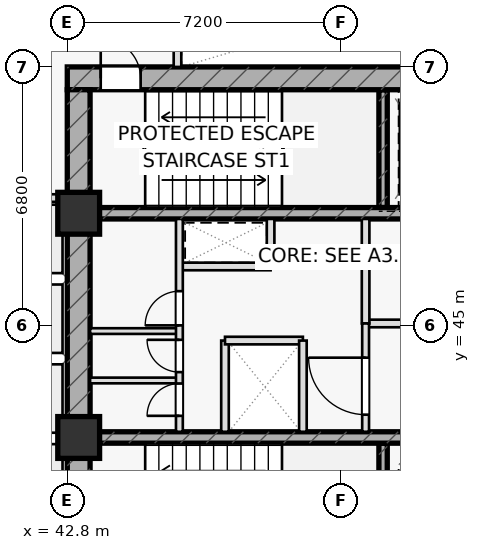
"""IFC4 building model, lengths in metres.
Left out: names, types, materials, properties, quantities, classifications, styles, units other than length and angle.
Written with IfcOpenShell. Run it as: python <this file> out.ifc"""

import sys

from ifc_helpers import new_model, si_unit, direction, frame, frame_2d, origin, origin_2d, place, context, subcontext, project, spatial, rectangle, extrude, element, fill, save


model = new_model("IFC4")
c1 = context("Model", 3, precision=1e-05, world=origin(), true_north=direction((0.0, 1.0)))
c2 = subcontext(c1, "Body", "Model", "MODEL_VIEW")
j1 = project(units=[si_unit("LENGTHUNIT", "METRE"), si_unit("PLANEANGLEUNIT", "RADIAN")], contexts=[c1])
p1 = place(None, origin())
s1 = spatial("IfcSite", under=j1, at=p1, CompositionType="ELEMENT")
p2 = place(p1, origin())
s2 = spatial("IfcBuilding", under=s1, at=p2, CompositionType="ELEMENT")
p3 = place(p2, frame((0.0, 0.0, 43.2)))
s3 = spatial("IfcBuildingStorey", under=s2, at=p3, CompositionType="ELEMENT", Elevation=43.2)
for number, where, z_axis, x_axis in (
    (1, (51.11, 48.1, 0.0), (0.0, 0.0, 1.0), (0.0, 1.0, 0.0)),
    (2, (51.11, 38.8, 0.0), (0.0, 0.0, 1.0), (0.0, 1.0, 0.0)),
):
    element("IfcWall", number, at=place(p3, frame(where, z_axis=z_axis, x_axis=x_axis)), inside=s3, PredefinedType="SHEAR", context=c2, shape_type="SweptSolid", body=[
        extrude(rectangle(XDim=3.1, YDim=0.22, at=frame_2d((1.55, 0.0))), origin(), (0.0, 0.0, 1.0), 3.6),
    ])
p4 = place(p3, frame((42.8, 51.5, 0.0), z_axis=(0.0, 0.0, 1.0), x_axis=(1.0, 0.0, 0.0)))
e3 = element("IfcWall", 3, at=p4, inside=s3, PredefinedType="SHEAR", context=c2, shape_type="SweptSolid", body=[
    extrude(rectangle(XDim=14.4, YDim=0.6, at=frame_2d((7.2, 0.0))), origin(), (0.0, 0.0, 1.0), 3.6),
])
p5 = place(p4, frame((0.88, 0.0, 0.0)))
e4 = element("IfcOpeningElement", 4, at=p5, cuts=e3, PredefinedType="OPENING", context=c2, shape_type="SweptSolid", body=[
    extrude(rectangle(XDim=1.05, YDim=2.2, at=frame_2d((0.525, 1.1))), frame((0.0, 0.31, 0.0), z_axis=(0.0, -1.0, 0.0), x_axis=(1.0, 0.0, 0.0)), (0.0, 0.0, 1.0), 0.62),
])
p6 = place(p3, frame((43.1, 38.8, 0.0), z_axis=(0.0, 0.0, 1.0), x_axis=(0.0, 1.0, 0.0)))
e5 = element("IfcWall", 5, at=p6, inside=s3, PredefinedType="SHEAR", context=c2, shape_type="SweptSolid", body=[
    extrude(rectangle(XDim=12.4, YDim=0.6, at=frame_2d((6.2, 0.0))), origin(), (0.0, 0.0, 1.0), 3.6),
])
p7 = place(p3, frame((43.4, 47.95, 0.0), z_axis=(0.0, 0.0, 1.0), x_axis=(1.0, 0.0, 0.0)))
e6 = element("IfcWall", 6, at=p7, inside=s3, PredefinedType="SHEAR", context=c2, shape_type="SweptSolid", body=[
    extrude(rectangle(XDim=13.2, YDim=0.3, at=frame_2d((6.6, 0.0))), origin(), (0.0, 0.0, 1.0), 3.6),
])
p8 = place(p7, frame((8.345, 0.0, 0.0)))
e7 = element("IfcOpeningElement", 7, at=p8, cuts=e6, PredefinedType="OPENING", context=c2, shape_type="SweptSolid", body=[
    extrude(rectangle(XDim=1.15, YDim=2.2, at=frame_2d((0.575, 1.1))), frame((0.0, 0.16, 0.0), z_axis=(0.0, -1.0, 0.0), x_axis=(1.0, 0.0, 0.0)), (0.0, 0.0, 1.0), 0.32),
])
p9 = place(p7, frame((10.065, 0.0, 0.0)))
e8 = element("IfcOpeningElement", 8, at=p9, cuts=e6, PredefinedType="OPENING", context=c2, shape_type="SweptSolid", body=[
    extrude(rectangle(XDim=1.15, YDim=2.2, at=frame_2d((0.575, 1.1))), frame((0.0, 0.16, 0.0), z_axis=(0.0, -1.0, 0.0), x_axis=(1.0, 0.0, 0.0)), (0.0, 0.0, 1.0), 0.32),
])
p10 = place(p7, frame((11.645, 0.0, 0.0)))
e9 = element("IfcOpeningElement", 9, at=p10, cuts=e6, PredefinedType="OPENING", context=c2, shape_type="SweptSolid", body=[
    extrude(rectangle(XDim=1.15, YDim=2.2, at=frame_2d((0.575, 1.1))), frame((0.0, 0.16, 0.0), z_axis=(0.0, -1.0, 0.0), x_axis=(1.0, 0.0, 0.0)), (0.0, 0.0, 1.0), 0.32),
])
p11 = place(p3, frame((43.4, 42.05, 0.0), z_axis=(0.0, 0.0, 1.0), x_axis=(1.0, 0.0, 0.0)))
e10 = element("IfcWall", 10, at=p11, inside=s3, PredefinedType="SHEAR", context=c2, shape_type="SweptSolid", body=[
    extrude(rectangle(XDim=13.2, YDim=0.3, at=frame_2d((6.6, 0.0))), origin(), (0.0, 0.0, 1.0), 3.6),
])
for number, where, z_axis, x_axis in (
    (11, (43.1, 47.95, 0.0), (0.0, 0.0, 1.0), (1.0, 0.0, 0.0)),
    (12, (43.1, 42.05, 0.0), (0.0, 0.0, 1.0), (1.0, 0.0, 0.0)),
):
    element("IfcColumn", number, at=place(p3, frame(where, z_axis=z_axis, x_axis=x_axis)), inside=s3, PredefinedType="COLUMN", context=c2, shape_type="SweptSolid", body=[
        extrude(rectangle(XDim=1.1, YDim=1.1, at=origin_2d()), origin(), (0.0, 0.0, 1.0), 3.6),
    ])
for number, where, z_axis, x_axis in (
    (13, (40.3, 48.35, 0.0), (0.0, 0.0, 1.0), (1.0, 0.0, 0.0)),
    (14, (45.7, 51.8, 0.0), (0.0, 0.0, 1.0), (0.0, 1.0, 0.0)),
):
    element("IfcWall", number, at=place(p3, frame(where, z_axis=z_axis, x_axis=x_axis)), inside=s3, PredefinedType="PARTITIONING", context=c2, shape_type="SweptSolid", body=[
        extrude(rectangle(XDim=2.5, YDim=0.2, at=frame_2d((1.25, 0.0))), origin(), (0.0, 0.0, 1.0), 3.6),
    ])
p12 = place(p3, frame((45.75, 46.55, 0.0), z_axis=(0.0, 0.0, 1.0), x_axis=(1.0, 0.0, 0.0)))
e15 = element("IfcWall", 15, at=p12, inside=s3, PredefinedType="PARTITIONING", context=c2, shape_type="SweptSolid", body=[
    extrude(rectangle(XDim=2.4, YDim=0.2, at=frame_2d((1.2, 0.0))), origin(), (0.0, 0.0, 1.0), 3.6),
])
p13 = place(p3, frame((48.15, 46.55, 0.0), z_axis=(0.0, 0.0, 1.0), x_axis=(0.0, 1.0, 0.0)))
e16 = element("IfcWall", 16, at=p13, inside=s3, PredefinedType="PARTITIONING", context=c2, shape_type="SweptSolid", body=[
    extrude(rectangle(XDim=1.25, YDim=0.2, at=frame_2d((0.625, 0.0))), origin(), (0.0, 0.0, 1.0), 3.6),
])
p14 = place(p3, frame((46.95, 42.2, 0.0), z_axis=(0.0, 0.0, 1.0), x_axis=(0.0, 1.0, 0.0)))
e17 = element("IfcWall", 17, at=p14, inside=s3, PredefinedType="PARTITIONING", context=c2, shape_type="SweptSolid", body=[
    extrude(rectangle(XDim=2.4, YDim=0.2, at=frame_2d((1.2, 0.0))), origin(), (0.0, 0.0, 1.0), 3.6),
])
p15 = place(p3, frame((46.95, 44.6, 0.0), z_axis=(0.0, 0.0, 1.0), x_axis=(1.0, 0.0, 0.0)))
e18 = element("IfcWall", 18, at=p15, inside=s3, PredefinedType="PARTITIONING", context=c2, shape_type="SweptSolid", body=[
    extrude(rectangle(XDim=2.05, YDim=0.2, at=frame_2d((1.025, 0.0))), origin(), (0.0, 0.0, 1.0), 3.6),
])
p16 = place(p3, frame((50.65, 45.05, 0.0), z_axis=(0.0, 0.0, 1.0), x_axis=(1.0, 0.0, 0.0)))
e19 = element("IfcWall", 19, at=p16, inside=s3, PredefinedType="PARTITIONING", context=c2, shape_type="SweptSolid", body=[
    extrude(rectangle(XDim=5.95, YDim=0.2, at=frame_2d((2.975, 0.0))), origin(), (0.0, 0.0, 1.0), 3.6),
])
p17 = place(p16, frame((1.35, 0.0, 0.0)))
e20 = element("IfcOpeningElement", 20, at=p17, cuts=e19, PredefinedType="OPENING", context=c2, shape_type="SweptSolid", body=[
    extrude(rectangle(XDim=1.5, YDim=2.2, at=frame_2d((0.75, 1.1))), frame((0.0, 0.11, 0.0), z_axis=(0.0, -1.0, 0.0), x_axis=(1.0, 0.0, 0.0)), (0.0, 0.0, 1.0), 0.22),
])
p18 = place(p3, frame((50.65, 45.05, 0.0), z_axis=(0.0, 0.0, 1.0), x_axis=(0.0, 1.0, 0.0)))
e21 = element("IfcWall", 21, at=p18, inside=s3, PredefinedType="PARTITIONING", context=c2, shape_type="SweptSolid", body=[
    extrude(rectangle(XDim=2.75, YDim=0.2, at=frame_2d((1.375, 0.0))), origin(), (0.0, 0.0, 1.0), 3.6),
])
p19 = place(p3, frame((50.65, 42.2, 0.0), z_axis=(0.0, 0.0, 1.0), x_axis=(0.0, 1.0, 0.0)))
e22 = element("IfcWall", 22, at=p19, inside=s3, PredefinedType="PARTITIONING", context=c2, shape_type="SweptSolid", body=[
    extrude(rectangle(XDim=2.85, YDim=0.18, at=frame_2d((1.425, 0.0))), origin(), (0.0, 0.0, 1.0), 3.6),
])
p20 = place(p19, frame((0.45, 0.0, 0.0)))
e23 = element("IfcOpeningElement", 23, at=p20, cuts=e22, PredefinedType="OPENING", context=c2, shape_type="SweptSolid", body=[
    extrude(rectangle(XDim=1.5, YDim=2.2, at=frame_2d((0.75, 1.1))), frame((0.0, 0.1, 0.0), z_axis=(0.0, -1.0, 0.0), x_axis=(1.0, 0.0, 0.0)), (0.0, 0.0, 1.0), 0.2),
])
for number, where, z_axis, x_axis in (
    (24, (43.4, 43.55, 0.0), (0.0, 0.0, 1.0), (1.0, 0.0, 0.0)),
    (25, (43.4, 44.85, 0.0), (0.0, 0.0, 1.0), (1.0, 0.0, 0.0)),
):
    element("IfcWall", number, at=place(p3, frame(where, z_axis=z_axis, x_axis=x_axis)), inside=s3, PredefinedType="PARTITIONING", context=c2, shape_type="SweptSolid", body=[
        extrude(rectangle(XDim=2.35, YDim=0.15, at=frame_2d((1.175, 0.0))), origin(), (0.0, 0.0, 1.0), 3.6),
    ])
p21 = place(p3, frame((45.75, 42.2, 0.0), z_axis=(0.0, 0.0, 1.0), x_axis=(0.0, 1.0, 0.0)))
e26 = element("IfcWall", 26, at=p21, inside=s3, PredefinedType="PARTITIONING", context=c2, shape_type="SweptSolid", body=[
    extrude(rectangle(XDim=5.6, YDim=0.18, at=frame_2d((2.8, 0.0))), origin(), (0.0, 0.0, 1.0), 3.6),
])
p22 = place(p21, frame((0.42, 0.0, 0.0)))
e27 = element("IfcOpeningElement", 27, at=p22, cuts=e26, PredefinedType="OPENING", context=c2, shape_type="SweptSolid", body=[
    extrude(rectangle(XDim=0.85, YDim=2.05, at=frame_2d((0.425, 1.025))), frame((0.0, 0.1, 0.0), z_axis=(0.0, -1.0, 0.0), x_axis=(1.0, 0.0, 0.0)), (0.0, 0.0, 1.0), 0.2),
])
p23 = place(p21, frame((1.57, 0.0, 0.0)))
e28 = element("IfcOpeningElement", 28, at=p23, cuts=e26, PredefinedType="OPENING", context=c2, shape_type="SweptSolid", body=[
    extrude(rectangle(XDim=0.85, YDim=2.05, at=frame_2d((0.425, 1.025))), frame((0.0, 0.1, 0.0), z_axis=(0.0, -1.0, 0.0), x_axis=(1.0, 0.0, 0.0)), (0.0, 0.0, 1.0), 0.2),
])
p24 = place(p21, frame((2.8, 0.0, 0.0)))
e29 = element("IfcOpeningElement", 29, at=p24, cuts=e26, PredefinedType="OPENING", context=c2, shape_type="SweptSolid", body=[
    extrude(rectangle(XDim=0.9, YDim=2.05, at=frame_2d((0.45, 1.025))), frame((0.0, 0.1, 0.0), z_axis=(0.0, -1.0, 0.0), x_axis=(1.0, 0.0, 0.0)), (0.0, 0.0, 1.0), 0.2),
])
p25 = place(p3, frame((49.0, 42.2, 0.0), z_axis=(0.0, 0.0, 1.0), x_axis=(0.0, 1.0, 0.0)))
e30 = element("IfcWall", 30, at=p25, inside=s3, PredefinedType="PARTITIONING", context=c2, shape_type="SweptSolid", body=[
    extrude(rectangle(XDim=2.4, YDim=0.2, at=frame_2d((1.2, 0.0))), origin(), (0.0, 0.0, 1.0), 3.6),
])
p26 = place(p5, origin())
e31 = element("IfcDoor", 31, at=p26, inside=s3, OperationType="SINGLE_SWING_LEFT", PredefinedType="DOOR", context=c2, shape_type="SweptSolid", body=[
    extrude(rectangle(XDim=1.05, YDim=2.2, at=frame_2d((0.525, 1.1))), frame((0.0, 0.025, 0.0), z_axis=(0.0, -1.0, 0.0), x_axis=(1.0, 0.0, 0.0)), (0.0, 0.0, 1.0), 0.05),
])
fill(e4, e31)
p27 = place(p20, origin())
e32 = element("IfcDoor", 32, at=p27, inside=s3, OperationType="SINGLE_SWING_RIGHT", PredefinedType="DOOR", context=c2, shape_type="SweptSolid", body=[
    extrude(rectangle(XDim=1.5, YDim=2.2, at=frame_2d((0.75, 1.1))), frame((0.0, 0.025, 0.0), z_axis=(0.0, -1.0, 0.0), x_axis=(1.0, 0.0, 0.0)), (0.0, 0.0, 1.0), 0.05),
])
fill(e23, e32)
p28 = place(p22, origin())
e33 = element("IfcDoor", 33, at=p28, inside=s3, OperationType="SINGLE_SWING_LEFT", PredefinedType="DOOR", context=c2, shape_type="SweptSolid", body=[
    extrude(rectangle(XDim=0.85, YDim=2.05, at=frame_2d((0.425, 1.025))), frame((0.0, 0.025, 0.0), z_axis=(0.0, -1.0, 0.0), x_axis=(1.0, 0.0, 0.0)), (0.0, 0.0, 1.0), 0.05),
])
fill(e27, e33)
p29 = place(p23, origin())
e34 = element("IfcDoor", 34, at=p29, inside=s3, OperationType="SINGLE_SWING_RIGHT", PredefinedType="DOOR", context=c2, shape_type="SweptSolid", body=[
    extrude(rectangle(XDim=0.85, YDim=2.05, at=frame_2d((0.425, 1.025))), frame((0.0, 0.025, 0.0), z_axis=(0.0, -1.0, 0.0), x_axis=(1.0, 0.0, 0.0)), (0.0, 0.0, 1.0), 0.05),
])
fill(e28, e34)
p30 = place(p24, origin())
e35 = element("IfcDoor", 35, at=p30, inside=s3, OperationType="SINGLE_SWING_LEFT", PredefinedType="DOOR", context=c2, shape_type="SweptSolid", body=[
    extrude(rectangle(XDim=0.9, YDim=2.05, at=frame_2d((0.45, 1.025))), frame((0.0, 0.025, 0.0), z_axis=(0.0, -1.0, 0.0), x_axis=(1.0, 0.0, 0.0)), (0.0, 0.0, 1.0), 0.05),
])
fill(e29, e35)
save(model, sys.argv[1])
